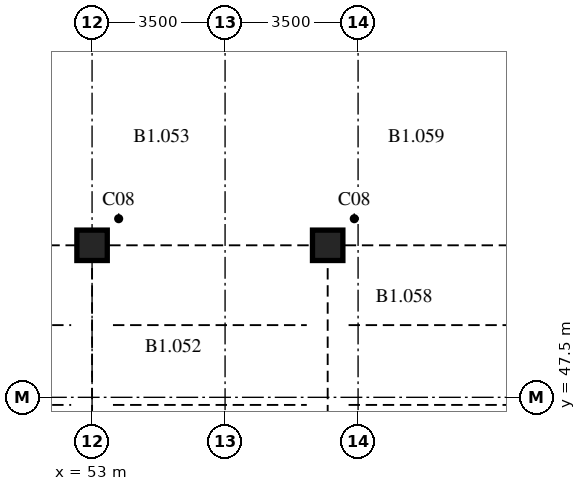
"""IFC4 building model, lengths in metres.
Left out: names, types, materials, properties, quantities, classifications, styles, units other than length and angle.
Written with IfcOpenShell. Run it as: python <this file> out.ifc"""

import sys

from ifc_helpers import new_model, si_unit, direction, frame, origin, origin_2d, place, context, subcontext, project, spatial, rectangle, extrude, element, save


model = new_model("IFC4")
c1 = context("Model", 3, precision=1e-05, world=origin(), true_north=direction((0.0, 1.0)))
c2 = subcontext(c1, "Body", "Model", "MODEL_VIEW")
j1 = project(units=[si_unit("LENGTHUNIT", "METRE"), si_unit("PLANEANGLEUNIT", "RADIAN")], contexts=[c1])
p1 = place(None, origin())
s1 = spatial("IfcSite", under=j1, at=p1, CompositionType="ELEMENT")
p2 = place(p1, origin())
s2 = spatial("IfcBuilding", under=s1, at=p2, CompositionType="ELEMENT")
p3 = place(p2, frame((0.0, 0.0, -4.0)))
s3 = spatial("IfcBuildingStorey", under=s2, at=p3, CompositionType="ELEMENT", Elevation=-4.0)
for number, where, z_axis, x_axis in (
    (1, (53.0, 51.5, 0.0), (0.0, 0.0, 1.0), (1.0, 0.0, 0.0)),
    (2, (59.2, 51.5, 0.0), (0.0, 0.0, 1.0), (1.0, 0.0, 0.0)),
):
    element("IfcColumn", number, at=place(p3, frame(where, z_axis=z_axis, x_axis=x_axis)), inside=s3, PredefinedType="COLUMN", context=c2, shape_type="SweptSolid", body=[
        extrude(rectangle(XDim=0.8, YDim=0.8, at=origin_2d()), origin(), (0.0, 0.0, 1.0), 3.6),
    ])
save(model, sys.argv[1])
